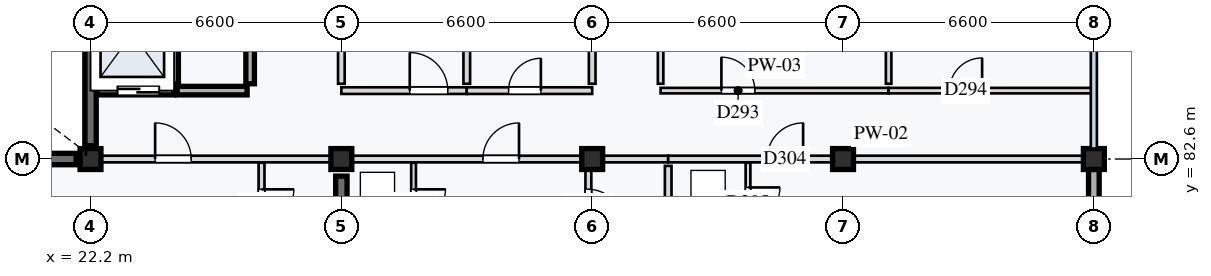
"""IFC4 building model, lengths in metres.
Left out: names, types, materials, properties, quantities, classifications, styles, units other than length and angle.
Written with IfcOpenShell. Run it as: python <this file> out.ifc"""

import sys

from ifc_helpers import new_model, si_unit, direction, frame, frame_2d, origin, origin_2d, place, context, subcontext, project, spatial, rectangle, extrude, element, fill, save


model = new_model("IFC4")
c1 = context("Model", 3, precision=1e-05, world=origin(), true_north=direction((0.0, 1.0)))
c2 = subcontext(c1, "Body", "Model", "MODEL_VIEW")
j1 = project(units=[si_unit("LENGTHUNIT", "METRE"), si_unit("PLANEANGLEUNIT", "RADIAN")], contexts=[c1])
p1 = place(None, origin())
s1 = spatial("IfcSite", under=j1, at=p1, CompositionType="ELEMENT")
p2 = place(p1, origin())
s2 = spatial("IfcBuilding", under=s1, at=p2, CompositionType="ELEMENT")
p3 = place(p2, frame((0.0, 0.0, 30.8)))
s3 = spatial("IfcBuildingStorey", under=s2, at=p3, CompositionType="ELEMENT", Elevation=30.8)
for number, where, z_axis, x_axis in (
    (1, (22.2, 82.6, 0.0), (0.0, 0.0, 1.0), (1.0, 0.0, 0.0)),
    (2, (28.8, 82.6, 0.0), (0.0, 0.0, 1.0), (1.0, 0.0, 0.0)),
    (3, (35.4, 82.6, 0.0), (0.0, 0.0, 1.0), (1.0, 0.0, 0.0)),
    (4, (42.0, 82.6, 0.0), (0.0, 0.0, 1.0), (1.0, 0.0, 0.0)),
    (5, (48.6, 82.6, 0.0), (0.0, 0.0, 1.0), (1.0, 0.0, 0.0)),
):
    element("IfcColumn", number, at=place(p3, frame(where, z_axis=z_axis, x_axis=x_axis)), inside=s3, PredefinedType="COLUMN", context=c2, shape_type="SweptSolid", body=[
        extrude(rectangle(XDim=0.55, YDim=0.55, at=origin_2d()), origin(), (0.0, 0.0, 1.0), 3.2),
    ])
p4 = place(p3, frame((15.98, 82.6, 0.0), z_axis=(0.0, 0.0, 1.0), x_axis=(1.0, 0.0, 0.0)))
e6 = element("IfcWall", 6, at=p4, inside=s3, PredefinedType="SHEAR", context=c2, shape_type="SweptSolid", body=[
    extrude(rectangle(XDim=5.84, YDim=0.3, at=frame_2d((2.92, 0.0))), origin(), (0.0, 0.0, 1.0), 2.97),
])
p5 = place(p3, frame((22.2, 82.95, 0.0), z_axis=(0.0, 0.0, 1.0), x_axis=(0.0, 1.0, 0.0)))
e7 = element("IfcWall", 7, at=p5, inside=s3, PredefinedType="SHEAR", context=c2, shape_type="SweptSolid", body=[
    extrude(rectangle(XDim=2.8, YDim=0.3, at=frame_2d((1.4, 0.0))), origin(), (0.0, 0.0, 1.0), 2.97),
])
p6 = place(p3, frame((28.8, 76.45, 0.0), z_axis=(0.0, 0.0, 1.0), x_axis=(0.0, 1.0, 0.0)))
e8 = element("IfcWall", 8, at=p6, inside=s3, PredefinedType="SHEAR", context=c2, shape_type="SweptSolid", body=[
    extrude(rectangle(XDim=5.7, YDim=0.3, at=frame_2d((2.85, 0.0))), origin(), (0.0, 0.0, 1.0), 2.97),
])
p7 = place(p3, frame((48.6, 76.275, 0.0), z_axis=(0.0, 0.0, 1.0), x_axis=(0.0, 1.0, 0.0)))
e9 = element("IfcWall", 9, at=p7, inside=s3, PredefinedType="STANDARD", context=c2, shape_type="SweptSolid", body=[
    extrude(rectangle(XDim=6.05, YDim=0.28, at=frame_2d((3.025, 0.0))), origin(), (0.0, 0.0, 1.0), 2.65),
])
p8 = place(p3, frame((22.36, 84.4, 0.0), z_axis=(0.0, 0.0, 1.0), x_axis=(1.0, 0.0, 0.0)))
e10 = element("IfcWall", 10, at=p8, inside=s3, PredefinedType="STANDARD", context=c2, shape_type="SweptSolid", body=[
    extrude(rectangle(XDim=2.04, YDim=0.225, at=frame_2d((1.02, 0.0))), origin(), (0.0, 0.0, 1.0), 2.97),
])
p9 = place(p8, frame((0.55, 0.0, 0.0)))
e11 = element("IfcOpeningElement", 11, at=p9, cuts=e10, PredefinedType="OPENING", context=c2, shape_type="SweptSolid", body=[
    extrude(rectangle(XDim=1.1, YDim=2.1, at=frame_2d((0.55, 1.05))), frame((0.0, 0.123, 0.0), z_axis=(0.0, -1.0, 0.0), x_axis=(1.0, 0.0, 0.0)), (0.0, 0.0, 1.0), 0.245),
])
p10 = place(p3, frame((24.48, 84.4, 0.0), z_axis=(0.0, 0.0, 1.0), x_axis=(1.0, 0.0, 0.0)))
e12 = element("IfcWall", 12, at=p10, inside=s3, PredefinedType="STANDARD", context=c2, shape_type="SweptSolid", body=[
    extrude(rectangle(XDim=1.84, YDim=0.225, at=frame_2d((0.92, 0.0))), origin(), (0.0, 0.0, 1.0), 2.97),
])
for number, where, z_axis, x_axis in (
    (13, (24.4, 84.58, 0.0), (0.0, 0.0, 1.0), (0.0, 1.0, 0.0)),
    (14, (26.4, 84.58, 0.0), (0.0, 0.0, 1.0), (0.0, 1.0, 0.0)),
):
    element("IfcWall", number, at=place(p3, frame(where, z_axis=z_axis, x_axis=x_axis)), inside=s3, PredefinedType="STANDARD", context=c2, shape_type="SweptSolid", body=[
        extrude(rectangle(XDim=2.64, YDim=0.225, at=frame_2d((1.32, 0.0))), origin(), (0.0, 0.0, 1.0), 2.97),
    ])
p11 = place(p3, frame((28.8, 84.4, 0.0), z_axis=(0.0, 0.0, 1.0), x_axis=(1.0, 0.0, 0.0)))
e15 = element("IfcWall", 15, at=p11, inside=s3, PredefinedType="PARTITIONING", context=c2, shape_type="SweptSolid", body=[
    extrude(rectangle(XDim=3.3, YDim=0.175, at=frame_2d((1.65, 0.0))), origin(), (0.0, 0.0, 1.0), 2.97),
])
p12 = place(p11, frame((1.8, 0.0, 0.0)))
e16 = element("IfcOpeningElement", 16, at=p12, cuts=e15, PredefinedType="OPENING", context=c2, shape_type="SweptSolid", body=[
    extrude(rectangle(XDim=1.0, YDim=2.1, at=frame_2d((0.5, 1.05))), frame((0.0, 0.097, 0.0), z_axis=(0.0, -1.0, 0.0), x_axis=(1.0, 0.0, 0.0)), (0.0, 0.0, 1.0), 0.195),
])
p13 = place(p3, frame((32.1, 84.4, 0.0), z_axis=(0.0, 0.0, 1.0), x_axis=(1.0, 0.0, 0.0)))
e17 = element("IfcWall", 17, at=p13, inside=s3, PredefinedType="PARTITIONING", context=c2, shape_type="SweptSolid", body=[
    extrude(rectangle(XDim=3.3, YDim=0.175, at=frame_2d((1.65, 0.0))), origin(), (0.0, 0.0, 1.0), 2.97),
])
p14 = place(p13, frame((1.1, 0.0, 0.0)))
e18 = element("IfcOpeningElement", 18, at=p14, cuts=e17, PredefinedType="OPENING", context=c2, shape_type="SweptSolid", body=[
    extrude(rectangle(XDim=0.85, YDim=2.0, at=frame_2d((0.425, 1.0))), frame((0.0, 0.097, 0.0), z_axis=(0.0, -1.0, 0.0), x_axis=(1.0, 0.0, 0.0)), (0.0, 0.0, 1.0), 0.195),
])
for number, where, z_axis, x_axis in (
    (19, (28.8, 84.58, 0.0), (0.0, 0.0, 1.0), (0.0, 1.0, 0.0)),
    (20, (32.1, 84.58, 0.0), (0.0, 0.0, 1.0), (0.0, 1.0, 0.0)),
    (21, (35.4, 84.58, 0.0), (0.0, 0.0, 1.0), (0.0, 1.0, 0.0)),
):
    element("IfcWall", number, at=place(p3, frame(where, z_axis=z_axis, x_axis=x_axis)), inside=s3, PredefinedType="PARTITIONING", context=c2, shape_type="SweptSolid", body=[
        extrude(rectangle(XDim=1.14, YDim=0.175, at=frame_2d((0.57, 0.0))), origin(), (0.0, 0.0, 1.0), 2.97),
    ])
p15 = place(p3, frame((37.2, 84.4, 0.0), z_axis=(0.0, 0.0, 1.0), x_axis=(1.0, 0.0, 0.0)))
e22 = element("IfcWall", 22, at=p15, inside=s3, PredefinedType="PARTITIONING", context=c2, shape_type="SweptSolid", body=[
    extrude(rectangle(XDim=6.0, YDim=0.145, at=frame_2d((3.0, 0.0))), origin(), (0.0, 0.0, 1.0), 2.97),
])
p16 = place(p15, frame((1.6, 0.0, 0.0)))
e23 = element("IfcOpeningElement", 23, at=p16, cuts=e22, PredefinedType="OPENING", context=c2, shape_type="SweptSolid", body=[
    extrude(rectangle(XDim=0.88, YDim=2.16, at=frame_2d((0.44, 1.08))), frame((0.0, 0.083, 0.0), z_axis=(0.0, -1.0, 0.0), x_axis=(1.0, 0.0, 0.0)), (0.0, 0.0, 1.0), 0.165),
])
p17 = place(p3, frame((43.2, 84.4, 0.0), z_axis=(0.0, 0.0, 1.0), x_axis=(1.0, 0.0, 0.0)))
e24 = element("IfcWall", 24, at=p17, inside=s3, PredefinedType="PARTITIONING", context=c2, shape_type="SweptSolid", body=[
    extrude(rectangle(XDim=5.4, YDim=0.145, at=frame_2d((2.7, 0.0))), origin(), (0.0, 0.0, 1.0), 2.97),
])
p18 = place(p17, frame((1.6, 0.0, 0.0)))
e25 = element("IfcOpeningElement", 25, at=p18, cuts=e24, PredefinedType="OPENING", context=c2, shape_type="SweptSolid", body=[
    extrude(rectangle(XDim=0.86, YDim=2.12, at=frame_2d((0.43, 1.06))), frame((0.0, 0.083, 0.0), z_axis=(0.0, -1.0, 0.0), x_axis=(1.0, 0.0, 0.0)), (0.0, 0.0, 1.0), 0.165),
])
for number, where, z_axis, x_axis in (
    (26, (43.2, 84.58, 0.0), (0.0, 0.0, 1.0), (0.0, 1.0, 0.0)),
    (27, (37.2, 84.58, 0.0), (0.0, 0.0, 1.0), (0.0, 1.0, 0.0)),
):
    element("IfcWall", number, at=place(p3, frame(where, z_axis=z_axis, x_axis=x_axis)), inside=s3, PredefinedType="PARTITIONING", context=c2, shape_type="SweptSolid", body=[
        extrude(rectangle(XDim=2.64, YDim=0.145, at=frame_2d((1.32, 0.0))), origin(), (0.0, 0.0, 1.0), 2.97),
    ])
p19 = place(p3, frame((22.2, 82.6, 0.0), z_axis=(0.0, 0.0, 1.0), x_axis=(1.0, 0.0, 0.0)))
e28 = element("IfcWall", 28, at=p19, inside=s3, PredefinedType="PARTITIONING", context=c2, shape_type="SweptSolid", body=[
    extrude(rectangle(XDim=6.6, YDim=0.175, at=frame_2d((3.3, 0.0))), origin(), (0.0, 0.0, 1.0), 2.55),
])
p20 = place(p19, frame((1.7, 0.0, 0.0)))
e29 = element("IfcOpeningElement", 29, at=p20, cuts=e28, PredefinedType="OPENING", context=c2, shape_type="SweptSolid", body=[
    extrude(rectangle(XDim=0.95, YDim=2.1, at=frame_2d((0.475, 1.05))), frame((0.0, 0.097, 0.0), z_axis=(0.0, -1.0, 0.0), x_axis=(1.0, 0.0, 0.0)), (0.0, 0.0, 1.0), 0.195),
])
p21 = place(p3, frame((26.7, 82.502, 0.0), z_axis=(0.0, 0.0, 1.0), x_axis=(0.0, -1.0, 0.0)))
e30 = element("IfcWall", 30, at=p21, inside=s3, PredefinedType="PARTITIONING", context=c2, shape_type="SweptSolid", body=[
    extrude(rectangle(XDim=2.302, YDim=0.155, at=frame_2d((1.151, 0.0))), origin(), (0.0, 0.0, 1.0), 2.97),
])
p22 = place(p21, frame((0.7, 0.0, 0.0)))
e31 = element("IfcOpeningElement", 31, at=p22, cuts=e30, PredefinedType="OPENING", context=c2, shape_type="SweptSolid", body=[
    extrude(rectangle(XDim=0.85, YDim=2.1, at=frame_2d((0.425, 1.05))), frame((0.0, 0.087, 0.0), z_axis=(0.0, -1.0, 0.0), x_axis=(1.0, 0.0, 0.0)), (0.0, 0.0, 1.0), 0.175),
])
p23 = place(p3, frame((28.8, 82.6, 0.0), z_axis=(0.0, 0.0, 1.0), x_axis=(1.0, 0.0, 0.0)))
e32 = element("IfcWall", 32, at=p23, inside=s3, PredefinedType="PARTITIONING", context=c2, shape_type="SweptSolid", body=[
    extrude(rectangle(XDim=8.6, YDim=0.175, at=frame_2d((4.3, 0.0))), origin(), (0.0, 0.0, 1.0), 2.55),
])
p24 = place(p23, frame((3.725, 0.0, 0.0)))
e33 = element("IfcOpeningElement", 33, at=p24, cuts=e32, PredefinedType="OPENING", context=c2, shape_type="SweptSolid", body=[
    extrude(rectangle(XDim=0.95, YDim=2.16, at=frame_2d((0.475, 1.08))), frame((0.0, 0.097, 0.0), z_axis=(0.0, -1.0, 0.0), x_axis=(1.0, 0.0, 0.0)), (0.0, 0.0, 1.0), 0.195),
])
p25 = place(p3, frame((30.7, 82.502, 0.0), z_axis=(0.0, 0.0, 1.0), x_axis=(0.0, -1.0, 0.0)))
e34 = element("IfcWall", 34, at=p25, inside=s3, PredefinedType="PARTITIONING", context=c2, shape_type="SweptSolid", body=[
    extrude(rectangle(XDim=2.302, YDim=0.125, at=frame_2d((1.151, 0.0))), origin(), (0.0, 0.0, 1.0), 2.97),
])
p26 = place(p25, frame((0.7, 0.0, 0.0)))
e35 = element("IfcOpeningElement", 35, at=p26, cuts=e34, PredefinedType="OPENING", context=c2, shape_type="SweptSolid", body=[
    extrude(rectangle(XDim=0.84, YDim=2.06, at=frame_2d((0.42, 1.03))), frame((0.0, 0.073, 0.0), z_axis=(0.0, -1.0, 0.0), x_axis=(1.0, 0.0, 0.0)), (0.0, 0.0, 1.0), 0.145),
])
p27 = place(p3, frame((35.3, 82.502, 0.0), z_axis=(0.0, 0.0, 1.0), x_axis=(0.0, -1.0, 0.0)))
e36 = element("IfcWall", 36, at=p27, inside=s3, PredefinedType="PARTITIONING", context=c2, shape_type="SweptSolid", body=[
    extrude(rectangle(XDim=2.302, YDim=0.155, at=frame_2d((1.151, 0.0))), origin(), (0.0, 0.0, 1.0), 2.97),
])
p28 = place(p27, frame((0.7, 0.0, 0.0)))
e37 = element("IfcOpeningElement", 37, at=p28, cuts=e36, PredefinedType="OPENING", context=c2, shape_type="SweptSolid", body=[
    extrude(rectangle(XDim=0.88, YDim=2.16, at=frame_2d((0.44, 1.08))), frame((0.0, 0.087, 0.0), z_axis=(0.0, -1.0, 0.0), x_axis=(1.0, 0.0, 0.0)), (0.0, 0.0, 1.0), 0.175),
])
p29 = place(p3, frame((37.4, 82.42, 0.0), z_axis=(0.0, 0.0, 1.0), x_axis=(0.0, -1.0, 0.0)))
e38 = element("IfcWall", 38, at=p29, inside=s3, PredefinedType="PARTITIONING", context=c2, shape_type="SweptSolid", body=[
    extrude(rectangle(XDim=2.132, YDim=0.175, at=frame_2d((1.066, 0.0))), origin(), (0.0, 0.0, 1.0), 2.97),
])
p30 = place(p3, frame((37.4, 82.6, 0.0), z_axis=(0.0, 0.0, 1.0), x_axis=(1.0, 0.0, 0.0)))
e39 = element("IfcWall", 39, at=p30, inside=s3, PredefinedType="PARTITIONING", context=c2, shape_type="SweptSolid", body=[
    extrude(rectangle(XDim=11.2, YDim=0.175, at=frame_2d((5.6, 0.0))), origin(), (0.0, 0.0, 1.0), 2.55),
])
p31 = place(p30, frame((2.6, 0.0, 0.0)))
e40 = element("IfcOpeningElement", 40, at=p31, cuts=e39, PredefinedType="OPENING", context=c2, shape_type="SweptSolid", body=[
    extrude(rectangle(XDim=0.95, YDim=2.16, at=frame_2d((0.475, 1.08))), frame((0.0, 0.097, 0.0), z_axis=(0.0, -1.0, 0.0), x_axis=(1.0, 0.0, 0.0)), (0.0, 0.0, 1.0), 0.195),
])
p32 = place(p3, frame((39.5, 82.502, 0.0), z_axis=(0.0, 0.0, 1.0), x_axis=(0.0, -1.0, 0.0)))
e41 = element("IfcWall", 41, at=p32, inside=s3, PredefinedType="PARTITIONING", context=c2, shape_type="SweptSolid", body=[
    extrude(rectangle(XDim=2.202, YDim=0.125, at=frame_2d((1.101, 0.0))), origin(), (0.0, 0.0, 1.0), 2.97),
])
p33 = place(p32, frame((0.65, 0.0, 0.0)))
e42 = element("IfcOpeningElement", 42, at=p33, cuts=e41, PredefinedType="OPENING", context=c2, shape_type="SweptSolid", body=[
    extrude(rectangle(XDim=0.84, YDim=2.06, at=frame_2d((0.42, 1.03))), frame((0.0, 0.073, 0.0), z_axis=(0.0, -1.0, 0.0), x_axis=(1.0, 0.0, 0.0)), (0.0, 0.0, 1.0), 0.145),
])
p34 = place(p9, origin())
e43 = element("IfcDoor", 43, at=p34, inside=s3, OperationType="DOUBLE_DOOR_SLIDING", PredefinedType="DOOR", context=c2, shape_type="SweptSolid", body=[
    extrude(rectangle(XDim=1.1, YDim=2.1, at=frame_2d((0.55, 1.05))), frame((0.0, 0.025, 0.0), z_axis=(0.0, -1.0, 0.0), x_axis=(1.0, 0.0, 0.0)), (0.0, 0.0, 1.0), 0.05),
])
fill(e11, e43)
p35 = place(p12, origin())
e44 = element("IfcDoor", 44, at=p35, inside=s3, OperationType="SINGLE_SWING_LEFT", PredefinedType="DOOR", context=c2, shape_type="SweptSolid", body=[
    extrude(rectangle(XDim=1.0, YDim=2.1, at=frame_2d((0.5, 1.05))), frame((0.0, 0.025, 0.0), z_axis=(0.0, -1.0, 0.0), x_axis=(1.0, 0.0, 0.0)), (0.0, 0.0, 1.0), 0.05),
])
fill(e16, e44)
p36 = place(p14, origin())
e45 = element("IfcDoor", 45, at=p36, inside=s3, OperationType="SINGLE_SWING_RIGHT", PredefinedType="DOOR", context=c2, shape_type="SweptSolid", body=[
    extrude(rectangle(XDim=0.85, YDim=2.0, at=frame_2d((0.425, 1.0))), frame((0.0, 0.025, 0.0), z_axis=(0.0, -1.0, 0.0), x_axis=(1.0, 0.0, 0.0)), (0.0, 0.0, 1.0), 0.05),
])
fill(e18, e45)
p37 = place(p16, origin())
e46 = element("IfcDoor", 46, at=p37, inside=s3, OperationType="SINGLE_SWING_LEFT", PredefinedType="DOOR", context=c2, shape_type="SweptSolid", body=[
    extrude(rectangle(XDim=0.88, YDim=2.16, at=frame_2d((0.44, 1.08))), frame((0.0, 0.025, 0.0), z_axis=(0.0, -1.0, 0.0), x_axis=(1.0, 0.0, 0.0)), (0.0, 0.0, 1.0), 0.05),
])
fill(e23, e46)
p38 = place(p18, origin())
e47 = element("IfcDoor", 47, at=p38, inside=s3, OperationType="SINGLE_SWING_RIGHT", PredefinedType="DOOR", context=c2, shape_type="SweptSolid", body=[
    extrude(rectangle(XDim=0.86, YDim=2.12, at=frame_2d((0.43, 1.06))), frame((0.0, 0.025, 0.0), z_axis=(0.0, -1.0, 0.0), x_axis=(1.0, 0.0, 0.0)), (0.0, 0.0, 1.0), 0.05),
])
fill(e25, e47)
p39 = place(p20, origin())
e48 = element("IfcDoor", 48, at=p39, inside=s3, OperationType="SINGLE_SWING_LEFT", PredefinedType="DOOR", context=c2, shape_type="SweptSolid", body=[
    extrude(rectangle(XDim=0.95, YDim=2.1, at=frame_2d((0.475, 1.05))), frame((0.0, 0.025, 0.0), z_axis=(0.0, -1.0, 0.0), x_axis=(1.0, 0.0, 0.0)), (0.0, 0.0, 1.0), 0.05),
])
fill(e29, e48)
p40 = place(p22, origin())
e49 = element("IfcDoor", 49, at=p40, inside=s3, OperationType="SINGLE_SWING_LEFT", PredefinedType="DOOR", context=c2, shape_type="SweptSolid", body=[
    extrude(rectangle(XDim=0.85, YDim=2.1, at=frame_2d((0.425, 1.05))), frame((0.0, 0.025, 0.0), z_axis=(0.0, -1.0, 0.0), x_axis=(1.0, 0.0, 0.0)), (0.0, 0.0, 1.0), 0.05),
])
fill(e31, e49)
p41 = place(p24, origin())
e50 = element("IfcDoor", 50, at=p41, inside=s3, OperationType="SINGLE_SWING_RIGHT", PredefinedType="DOOR", context=c2, shape_type="SweptSolid", body=[
    extrude(rectangle(XDim=0.95, YDim=2.16, at=frame_2d((0.475, 1.08))), frame((0.0, 0.025, 0.0), z_axis=(0.0, -1.0, 0.0), x_axis=(1.0, 0.0, 0.0)), (0.0, 0.0, 1.0), 0.05),
])
fill(e33, e50)
p42 = place(p26, origin())
e51 = element("IfcDoor", 51, at=p42, inside=s3, OperationType="SINGLE_SWING_LEFT", PredefinedType="DOOR", context=c2, shape_type="SweptSolid", body=[
    extrude(rectangle(XDim=0.84, YDim=2.06, at=frame_2d((0.42, 1.03))), frame((0.0, 0.025, 0.0), z_axis=(0.0, -1.0, 0.0), x_axis=(1.0, 0.0, 0.0)), (0.0, 0.0, 1.0), 0.05),
])
fill(e35, e51)
p43 = place(p28, origin())
e52 = element("IfcDoor", 52, at=p43, inside=s3, OperationType="SINGLE_SWING_RIGHT", PredefinedType="DOOR", context=c2, shape_type="SweptSolid", body=[
    extrude(rectangle(XDim=0.88, YDim=2.16, at=frame_2d((0.44, 1.08))), frame((0.0, 0.025, 0.0), z_axis=(0.0, -1.0, 0.0), x_axis=(1.0, 0.0, 0.0)), (0.0, 0.0, 1.0), 0.05),
])
fill(e37, e52)
p44 = place(p31, origin())
e53 = element("IfcDoor", 53, at=p44, inside=s3, OperationType="SINGLE_SWING_RIGHT", PredefinedType="DOOR", context=c2, shape_type="SweptSolid", body=[
    extrude(rectangle(XDim=0.95, YDim=2.16, at=frame_2d((0.475, 1.08))), frame((0.0, 0.025, 0.0), z_axis=(0.0, -1.0, 0.0), x_axis=(1.0, 0.0, 0.0)), (0.0, 0.0, 1.0), 0.05),
])
fill(e40, e53)
p45 = place(p33, origin())
e54 = element("IfcDoor", 54, at=p45, inside=s3, OperationType="SINGLE_SWING_LEFT", PredefinedType="DOOR", context=c2, shape_type="SweptSolid", body=[
    extrude(rectangle(XDim=0.84, YDim=2.06, at=frame_2d((0.42, 1.03))), frame((0.0, 0.025, 0.0), z_axis=(0.0, -1.0, 0.0), x_axis=(1.0, 0.0, 0.0)), (0.0, 0.0, 1.0), 0.05),
])
fill(e42, e54)
save(model, sys.argv[1])
